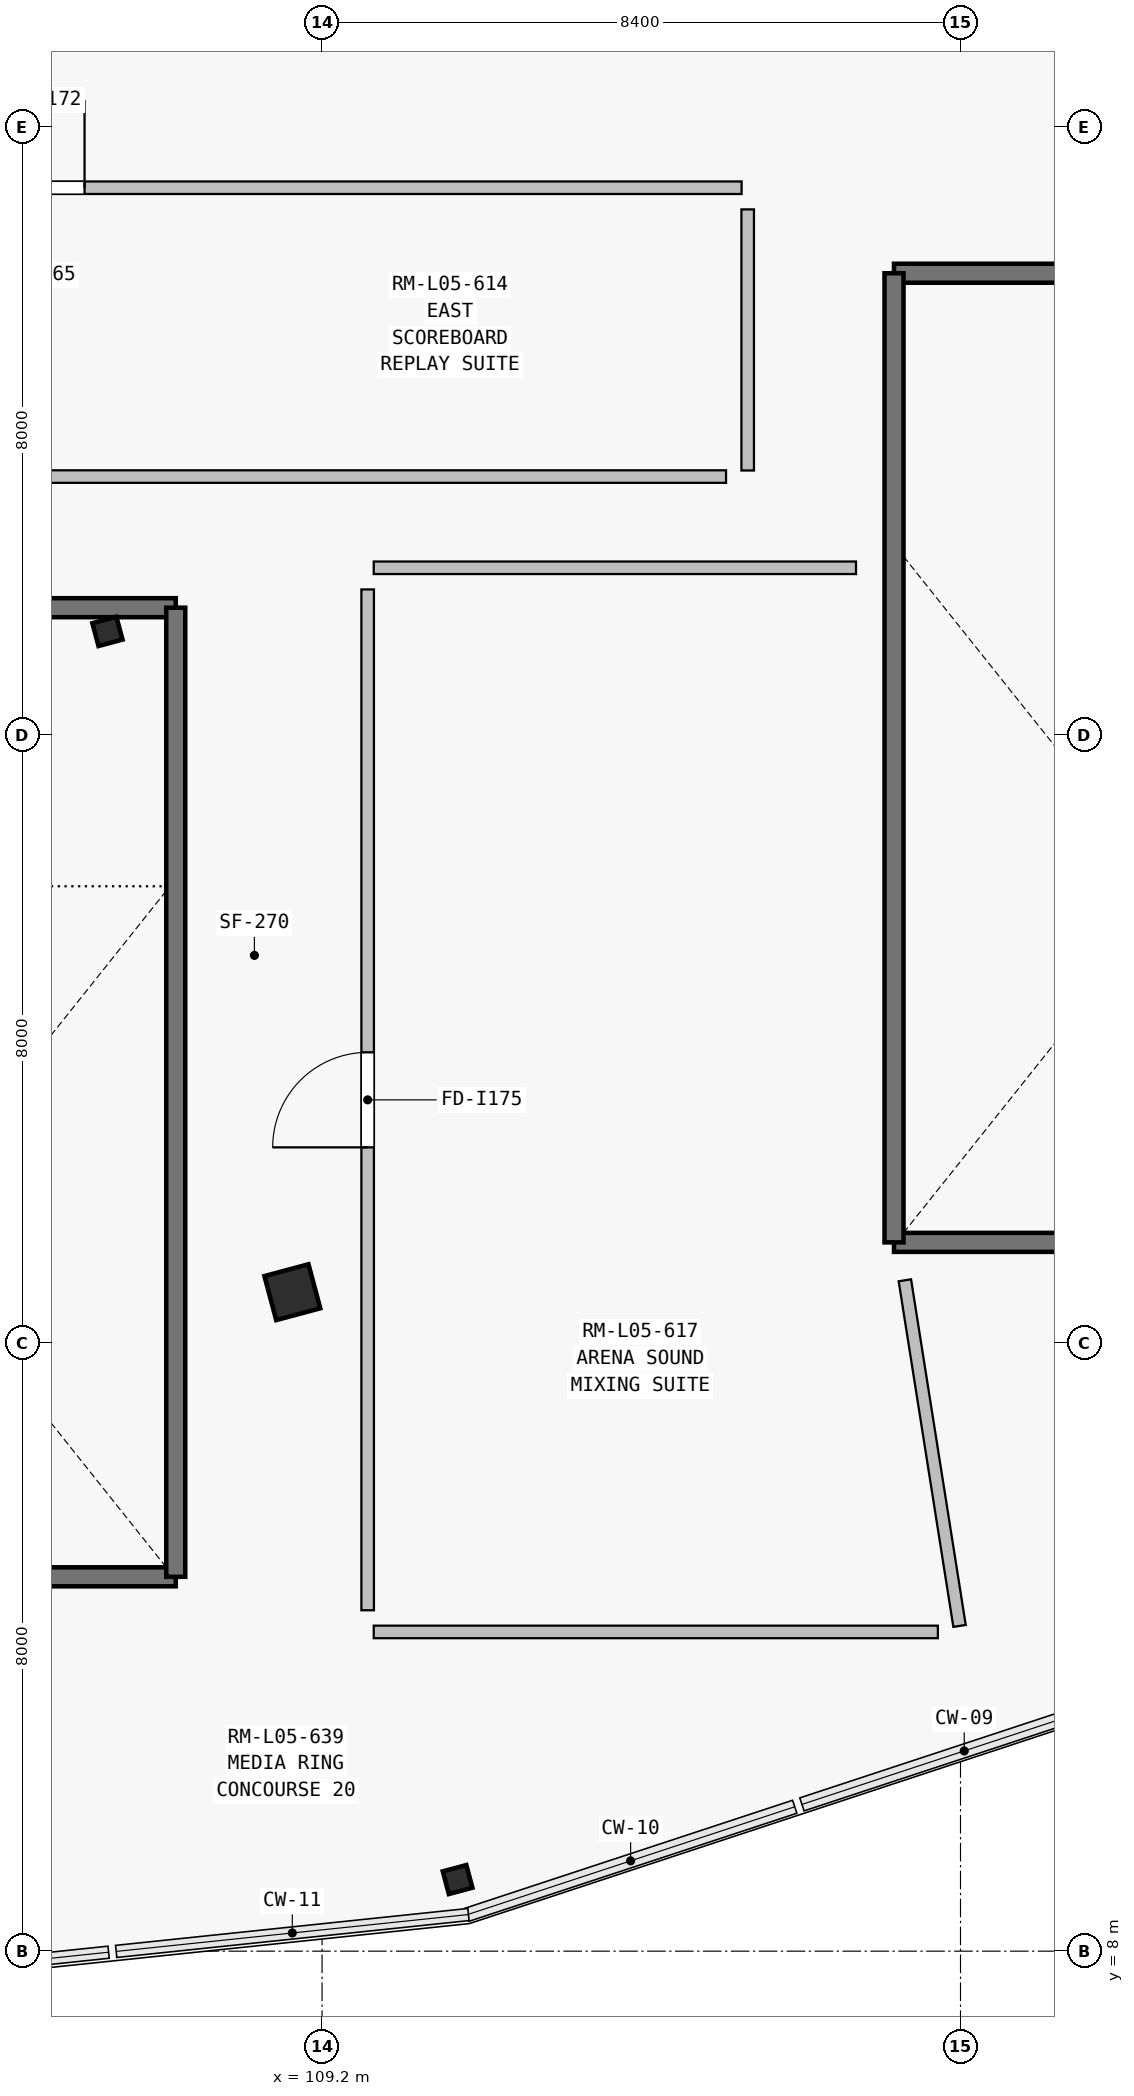
"""IFC4 building model, lengths in metres.
Left out: names, types, materials, properties, quantities, classifications, styles, units other than length and angle.
Written with IfcOpenShell. Run it as: python <this file> out.ifc"""

import sys

from ifc_helpers import new_model, si_unit, direction, frame, frame_2d, origin, origin_2d, place, context, subcontext, project, spatial, rectangle, i_section, extrude, element, fill, save


model = new_model("IFC4")
c1 = context("Model", 3, precision=1e-05, world=origin(), true_north=direction((0.0, 1.0)))
c2 = subcontext(c1, "Body", "Model", "MODEL_VIEW")
j1 = project(units=[si_unit("LENGTHUNIT", "METRE"), si_unit("PLANEANGLEUNIT", "RADIAN")], contexts=[c1])
p1 = place(None, origin())
s1 = spatial("IfcSite", under=j1, at=p1, CompositionType="ELEMENT")
p2 = place(p1, origin())
s2 = spatial("IfcBuilding", under=s1, at=p2, CompositionType="ELEMENT")
p3 = place(p2, frame((0.0, 0.0, 23.4)))
s3 = spatial("IfcBuildingStorey", under=s2, at=p3, CompositionType="ELEMENT", Elevation=23.4)
p4 = place(p3, frame((106.376, 25.363, 0.0), z_axis=(0.0, 0.0, 1.0), x_axis=(0.258819045103, -0.965925826289, 0.0)))
e1 = element("IfcColumn", 1, at=p4, inside=s3, PredefinedType="COLUMN", context=c2, shape_type="SweptSolid", body=[
    extrude(i_section(OverallWidth=0.311, OverallDepth=0.327, WebThickness=0.016, FlangeThickness=0.025, at=origin_2d()), origin(), (0.0, 0.0, 1.0), 3.15),
])
p5 = place(p3, frame((108.809, 16.67, 0.0), z_axis=(0.0, 0.0, 1.0), x_axis=(0.258819045103, -0.965925826289, 0.0)))
e2 = element("IfcColumn", 2, at=p5, inside=s3, PredefinedType="COLUMN", context=c2, shape_type="SweptSolid", body=[
    extrude(rectangle(XDim=0.6, YDim=0.6, at=origin_2d()), origin(), (0.0, 0.0, 1.0), 3.15),
])
p6 = place(p3, frame((110.983, 8.942, 0.0), z_axis=(0.0, 0.0, 1.0), x_axis=(0.258819045103, -0.965925826289, 0.0)))
e3 = element("IfcColumn", 3, at=p6, inside=s3, PredefinedType="COLUMN", context=c2, shape_type="SweptSolid", body=[
    extrude(i_section(OverallWidth=0.309, OverallDepth=0.321, WebThickness=0.014, FlangeThickness=0.022, at=origin_2d()), origin(), (0.0, 0.0, 1.0), 3.32),
])
p7 = place(p3, frame((99.925, 12.925, 0.0), z_axis=(0.0, 0.0, 1.0), x_axis=(1.0, 0.0, 0.0)))
e4 = element("IfcWall", 4, at=p7, inside=s3, PredefinedType="SHEAR", context=c2, shape_type="SweptSolid", body=[
    extrude(rectangle(XDim=7.35, YDim=0.25, at=frame_2d((3.675, 0.0))), origin(), (0.0, 0.0, 1.0), 3.08),
])
p8 = place(p3, frame((99.925, 25.675, 0.0), z_axis=(0.0, 0.0, 1.0), x_axis=(1.0, 0.0, 0.0)))
e5 = element("IfcWall", 5, at=p8, inside=s3, PredefinedType="SHEAR", context=c2, shape_type="SweptSolid", body=[
    extrude(rectangle(XDim=7.35, YDim=0.25, at=frame_2d((3.675, 0.0))), origin(), (0.0, 0.0, 1.0), 3.08),
])
p9 = place(p8, frame((2.975, 0.0, 0.0)))
e6 = element("IfcOpeningElement", 6, at=p9, cuts=e5, PredefinedType="OPENING", context=c2, shape_type="SweptSolid", body=[
    extrude(rectangle(XDim=1.4, YDim=2.2, at=frame_2d((0.7, 1.1))), frame((0.0, 0.135, 0.0), z_axis=(0.0, -1.0, 0.0), x_axis=(1.0, 0.0, 0.0)), (0.0, 0.0, 1.0), 0.27),
])
p10 = place(p3, frame((107.275, 12.925, 0.0), z_axis=(0.0, 0.0, 1.0), x_axis=(0.0, 1.0, 0.0)))
e7 = element("IfcWall", 7, at=p10, inside=s3, PredefinedType="SHEAR", context=c2, shape_type="SweptSolid", body=[
    extrude(rectangle(XDim=12.75, YDim=0.25, at=frame_2d((6.375, 0.0))), origin(), (0.0, 0.0, 1.0), 3.08),
])
p11 = place(p3, frame((116.725, 17.325, 0.0), z_axis=(0.0, 0.0, 1.0), x_axis=(1.0, 0.0, 0.0)))
e8 = element("IfcWall", 8, at=p11, inside=s3, PredefinedType="SHEAR", context=c2, shape_type="SweptSolid", body=[
    extrude(rectangle(XDim=7.35, YDim=0.25, at=frame_2d((3.675, 0.0))), origin(), (0.0, 0.0, 1.0), 3.08),
])
p12 = place(p3, frame((116.725, 30.075, 0.0), z_axis=(0.0, 0.0, 1.0), x_axis=(1.0, 0.0, 0.0)))
e9 = element("IfcWall", 9, at=p12, inside=s3, PredefinedType="SHEAR", context=c2, shape_type="SweptSolid", body=[
    extrude(rectangle(XDim=7.35, YDim=0.25, at=frame_2d((3.675, 0.0))), origin(), (0.0, 0.0, 1.0), 3.08),
])
p13 = place(p12, frame((3.015, 0.0, 0.0)))
e10 = element("IfcOpeningElement", 10, at=p13, cuts=e9, PredefinedType="OPENING", context=c2, shape_type="SweptSolid", body=[
    extrude(rectangle(XDim=1.32, YDim=2.2, at=frame_2d((0.66, 1.1))), frame((0.0, 0.135, 0.0), z_axis=(0.0, -1.0, 0.0), x_axis=(1.0, 0.0, 0.0)), (0.0, 0.0, 1.0), 0.27),
])
p14 = place(p3, frame((116.725, 17.325, 0.0), z_axis=(0.0, 0.0, 1.0), x_axis=(0.0, 1.0, 0.0)))
e11 = element("IfcWall", 11, at=p14, inside=s3, PredefinedType="SHEAR", context=c2, shape_type="SweptSolid", body=[
    extrude(rectangle(XDim=12.75, YDim=0.25, at=frame_2d((6.375, 0.0))), origin(), (0.0, 0.0, 1.0), 3.08),
])
p15 = place(p3, frame((96.28, 31.2, 0.0), z_axis=(0.0, 0.0, 1.0), x_axis=(1.0, 0.0, 0.0)))
e12 = element("IfcWall", 12, at=p15, inside=s3, PredefinedType="PARTITIONING", context=c2, shape_type="SweptSolid", body=[
    extrude(rectangle(XDim=18.44, YDim=0.165, at=frame_2d((9.22, 0.0))), origin(), (0.0, 0.0, 1.0), 3.9),
])
p16 = place(p15, frame((8.645, 0.0, 0.0)))
e13 = element("IfcOpeningElement", 13, at=p16, cuts=e12, PredefinedType="OPENING", context=c2, shape_type="SweptSolid", body=[
    extrude(rectangle(XDim=1.15, YDim=2.2, at=frame_2d((0.575, 1.1))), frame((0.0, 0.093, 0.0), z_axis=(0.0, -1.0, 0.0), x_axis=(1.0, 0.0, 0.0)), (0.0, 0.0, 1.0), 0.185),
])
p17 = place(p3, frame((114.8, 30.915, 0.0), z_axis=(0.0, 0.0, 1.0), x_axis=(0.0, -1.0, 0.0)))
e14 = element("IfcWall", 14, at=p17, inside=s3, PredefinedType="PARTITIONING", context=c2, shape_type="SweptSolid", body=[
    extrude(rectangle(XDim=3.435, YDim=0.165, at=frame_2d((1.718, 0.0))), origin(), (0.0, 0.0, 1.0), 2.445),
])
p18 = place(p3, frame((114.515, 27.4, 0.0), z_axis=(0.0, 0.0, 1.0), x_axis=(-1.0, 0.0, 0.0)))
e15 = element("IfcWall", 15, at=p18, inside=s3, PredefinedType="PARTITIONING", context=c2, shape_type="SweptSolid", body=[
    extrude(rectangle(XDim=18.235, YDim=0.165, at=frame_2d((9.118, 0.0))), origin(), (0.0, 0.0, 1.0), 2.445),
])
p19 = place(p3, frame((109.88, 26.2, 0.0), z_axis=(0.0, 0.0, 1.0), x_axis=(1.0, 0.0, 0.0)))
e16 = element("IfcWall", 16, at=p19, inside=s3, PredefinedType="PARTITIONING", context=c2, shape_type="SweptSolid", body=[
    extrude(rectangle(XDim=6.345, YDim=0.165, at=frame_2d((3.173, 0.0))), origin(), (0.0, 0.0, 1.0), 2.445),
])
p20 = place(p3, frame((116.868, 16.826, 0.0), z_axis=(0.0, 0.0, 1.0), x_axis=(0.156292094159, -0.987710879409, 0.0)))
e17 = element("IfcWall", 17, at=p20, inside=s3, PredefinedType="PARTITIONING", context=c2, shape_type="SweptSolid", body=[
    extrude(rectangle(XDim=4.604, YDim=0.165, at=frame_2d((2.302, 0.0))), origin(), (0.0, 0.0, 1.0), 3.18),
])
p21 = place(p3, frame((117.302, 12.2, 0.0), z_axis=(0.0, 0.0, 1.0), x_axis=(-1.0, 0.0, 0.0)))
e18 = element("IfcWall", 18, at=p21, inside=s3, PredefinedType="PARTITIONING", context=c2, shape_type="SweptSolid", body=[
    extrude(rectangle(XDim=7.422, YDim=0.165, at=frame_2d((3.711, 0.0))), origin(), (0.0, 0.0, 1.0), 3.18),
])
p22 = place(p3, frame((109.8, 12.485, 0.0), z_axis=(0.0, 0.0, 1.0), x_axis=(0.0, 1.0, 0.0)))
e19 = element("IfcWall", 19, at=p22, inside=s3, PredefinedType="PARTITIONING", context=c2, shape_type="SweptSolid", body=[
    extrude(rectangle(XDim=13.43, YDim=0.165, at=frame_2d((6.715, 0.0))), origin(), (0.0, 0.0, 1.0), 2.445),
])
p23 = place(p22, frame((6.09, 0.0, 0.0)))
e20 = element("IfcOpeningElement", 20, at=p23, cuts=e19, PredefinedType="OPENING", context=c2, shape_type="SweptSolid", body=[
    extrude(rectangle(XDim=1.25, YDim=2.25, at=frame_2d((0.625, 1.125))), frame((0.0, 0.093, 0.0), z_axis=(0.0, -1.0, 0.0), x_axis=(1.0, 0.0, 0.0)), (0.0, 0.0, 1.0), 0.185),
])
p24 = place(p16, origin())
e21 = element("IfcDoor", 21, at=p24, inside=s3, OperationType="SINGLE_SWING_RIGHT", PredefinedType="DOOR", context=c2, shape_type="SweptSolid", body=[
    extrude(rectangle(XDim=1.15, YDim=2.2, at=frame_2d((0.575, 1.1))), frame((0.0, 0.025, 0.0), z_axis=(0.0, -1.0, 0.0), x_axis=(1.0, 0.0, 0.0)), (0.0, 0.0, 1.0), 0.05),
])
fill(e13, e21)
p25 = place(p23, origin())
e22 = element("IfcDoor", 22, at=p25, inside=s3, OperationType="SINGLE_SWING_LEFT", PredefinedType="DOOR", context=c2, shape_type="SweptSolid", body=[
    extrude(rectangle(XDim=1.25, YDim=2.25, at=frame_2d((0.625, 1.125))), frame((0.0, 0.025, 0.0), z_axis=(0.0, -1.0, 0.0), x_axis=(1.0, 0.0, 0.0)), (0.0, 0.0, 1.0), 0.05),
])
fill(e20, e22)
save(model, sys.argv[1])
